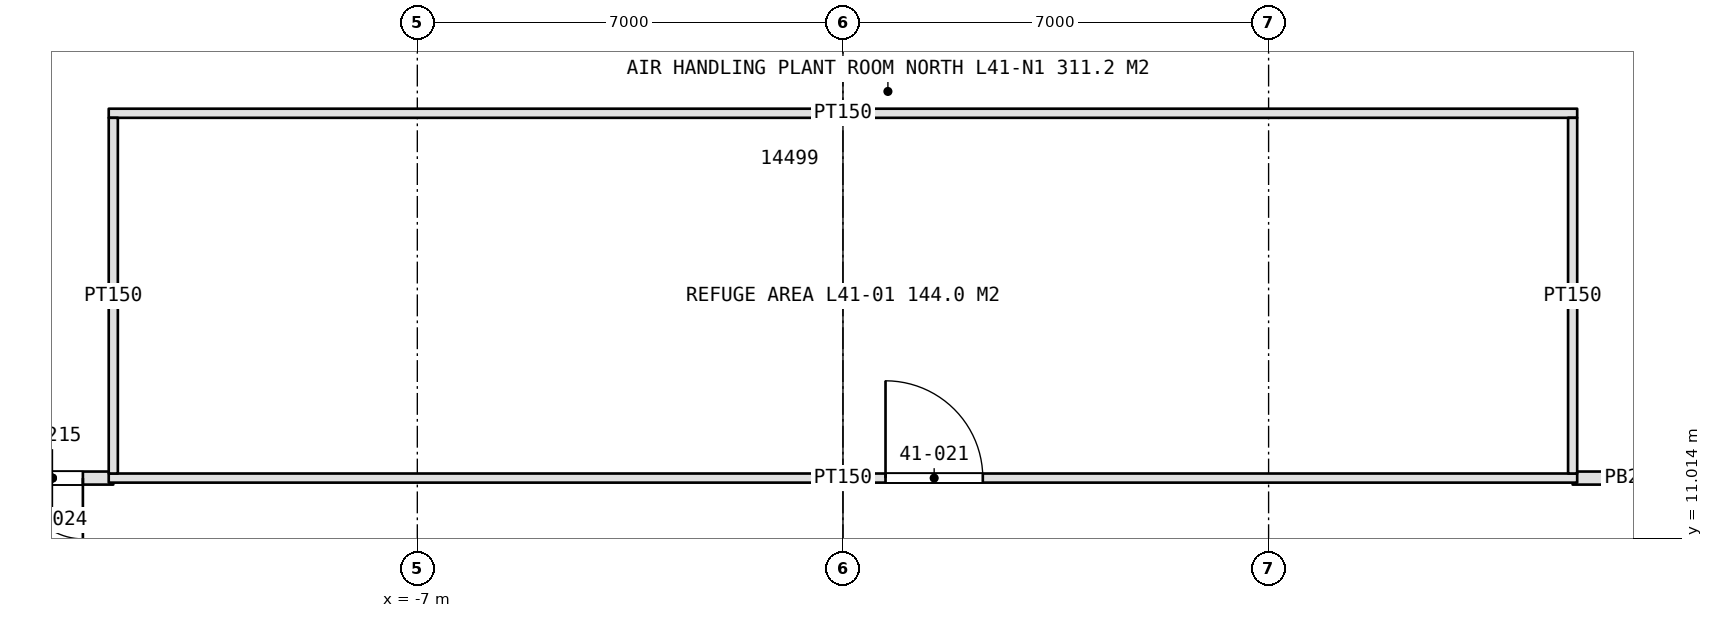
"""IFC4 building model, lengths in metres.
Left out: names, types, materials, properties, quantities, classifications, styles, units other than length and angle.
Written with IfcOpenShell. Run it as: python <this file> out.ifc"""

import sys

from ifc_helpers import new_model, si_unit, direction, frame, frame_2d, origin, place, context, subcontext, project, spatial, rectangle, extrude, element, fill, save


model = new_model("IFC4")
c1 = context("Model", 3, precision=1e-05, world=origin(), true_north=direction((0.0, 1.0)))
c2 = subcontext(c1, "Body", "Model", "MODEL_VIEW")
j1 = project(units=[si_unit("LENGTHUNIT", "METRE"), si_unit("PLANEANGLEUNIT", "RADIAN")], contexts=[c1])
p1 = place(None, origin())
s1 = spatial("IfcSite", under=j1, at=p1, CompositionType="ELEMENT")
p2 = place(p1, origin())
s2 = spatial("IfcBuilding", under=s1, at=p2, CompositionType="ELEMENT")
p3 = place(p2, frame((0.0, 0.0, 189.8)))
s3 = spatial("IfcBuildingStorey", under=s2, at=p3, CompositionType="ELEMENT", Elevation=189.8)
p4 = place(p3, frame((-12.0, 12.0, 0.0), z_axis=(0.0, 0.0, 1.0), x_axis=(-1.0, 0.0, 0.0)))
e1 = element("IfcWall", 1, at=p4, inside=s3, PredefinedType="PARTITIONING", context=c2, shape_type="SweptSolid", body=[
    extrude(rectangle(XDim=2.0, YDim=0.215, at=frame_2d((1.0, 0.0))), origin(), (0.0, 0.0, 1.0), 4.2),
])
p5 = place(p4, frame((0.5, 0.0, 0.0)))
e2 = element("IfcOpeningElement", 2, at=p5, cuts=e1, PredefinedType="OPENING", context=c2, shape_type="SweptSolid", body=[
    extrude(rectangle(XDim=1.0, YDim=2.2, at=frame_2d((0.5, 1.1))), frame((0.0, 0.118, 0.0), z_axis=(0.0, -1.0, 0.0), x_axis=(1.0, 0.0, 0.0)), (0.0, 0.0, 1.0), 0.235),
])
p6 = place(p3, frame((14.0, 12.0, 0.0), z_axis=(0.0, 0.0, 1.0), x_axis=(-1.0, 0.0, 0.0)))
e3 = element("IfcWall", 3, at=p6, inside=s3, PredefinedType="PARTITIONING", context=c2, shape_type="SweptSolid", body=[
    extrude(rectangle(XDim=2.0, YDim=0.215, at=frame_2d((1.0, 0.0))), origin(), (0.0, 0.0, 1.0), 4.2),
])
p7 = place(p3, frame((-12.075, 12.0, 0.0), z_axis=(0.0, 0.0, 1.0), x_axis=(1.0, 0.0, 0.0)))
e4 = element("IfcWall", 4, at=p7, inside=s3, PredefinedType="PARTITIONING", context=c2, shape_type="SweptSolid", body=[
    extrude(rectangle(XDim=24.15, YDim=0.15, at=frame_2d((12.075, 0.0))), origin(), (0.0, 0.0, 1.0), 4.2),
])
p8 = place(p7, frame((12.775, 0.0, 0.0)))
e5 = element("IfcOpeningElement", 5, at=p8, cuts=e4, PredefinedType="OPENING", context=c2, shape_type="SweptSolid", body=[
    extrude(rectangle(XDim=1.6, YDim=2.4, at=frame_2d((0.8, 1.2))), frame((0.0, 0.085, 0.0), z_axis=(0.0, -1.0, 0.0), x_axis=(1.0, 0.0, 0.0)), (0.0, 0.0, 1.0), 0.17),
])
p9 = place(p3, frame((-12.075, 18.0, 0.0), z_axis=(0.0, 0.0, 1.0), x_axis=(1.0, 0.0, 0.0)))
e6 = element("IfcWall", 6, at=p9, inside=s3, PredefinedType="PARTITIONING", context=c2, shape_type="SweptSolid", body=[
    extrude(rectangle(XDim=24.15, YDim=0.15, at=frame_2d((12.075, 0.0))), origin(), (0.0, 0.0, 1.0), 4.2),
])
for number, where, z_axis, x_axis in (
    (7, (-12.0, 12.075, 0.0), (0.0, 0.0, 1.0), (0.0, 1.0, 0.0)),
    (8, (12.0, 12.075, 0.0), (0.0, 0.0, 1.0), (0.0, 1.0, 0.0)),
):
    element("IfcWall", number, at=place(p3, frame(where, z_axis=z_axis, x_axis=x_axis)), inside=s3, PredefinedType="PARTITIONING", context=c2, shape_type="SweptSolid", body=[
        extrude(rectangle(XDim=5.85, YDim=0.15, at=frame_2d((2.925, 0.0))), origin(), (0.0, 0.0, 1.0), 4.2),
    ])
p10 = place(p8, origin())
e9 = element("IfcDoor", 9, at=p10, inside=s3, OperationType="DOUBLE_DOOR_SINGLE_SWING", PredefinedType="DOOR", context=c2, shape_type="SweptSolid", body=[
    extrude(rectangle(XDim=1.6, YDim=2.4, at=frame_2d((0.8, 1.2))), frame((0.0, 0.025, 0.0), z_axis=(0.0, -1.0, 0.0), x_axis=(1.0, 0.0, 0.0)), (0.0, 0.0, 1.0), 0.05),
])
fill(e5, e9)
p11 = place(p5, origin())
e10 = element("IfcDoor", 10, at=p11, inside=s3, OperationType="SINGLE_SWING_LEFT", PredefinedType="DOOR", context=c2, shape_type="SweptSolid", body=[
    extrude(rectangle(XDim=1.0, YDim=2.2, at=frame_2d((0.5, 1.1))), frame((0.0, 0.025, 0.0), z_axis=(0.0, -1.0, 0.0), x_axis=(1.0, 0.0, 0.0)), (0.0, 0.0, 1.0), 0.05),
])
fill(e2, e10)
save(model, sys.argv[1])
